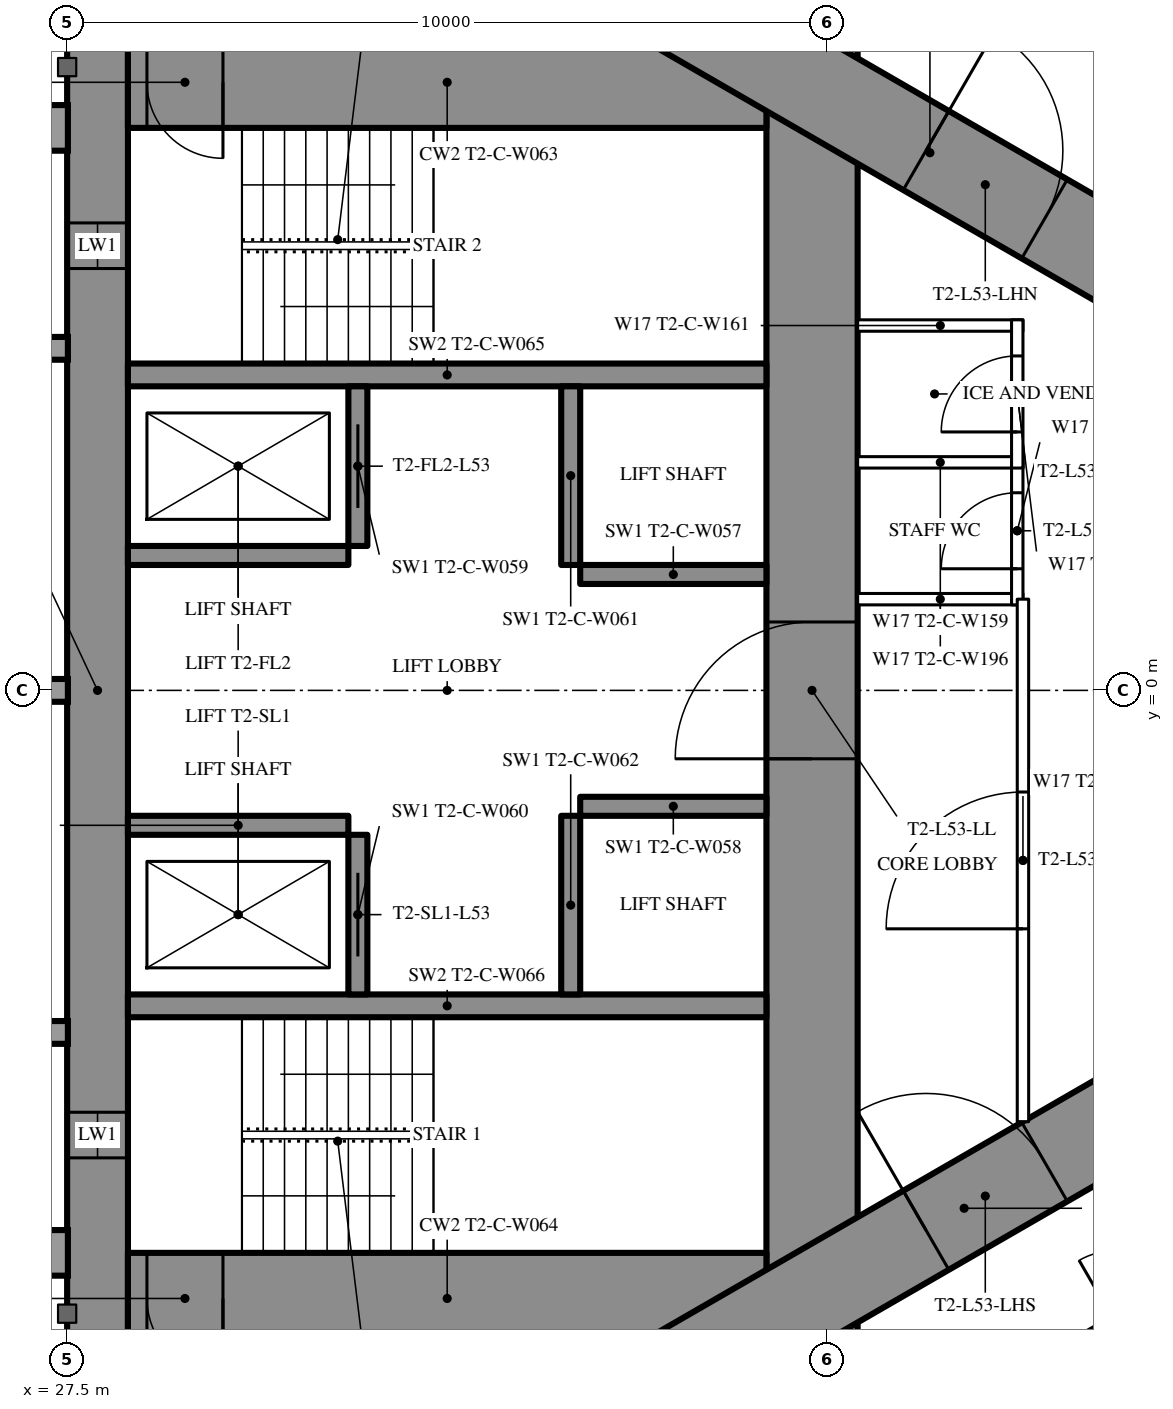
"""IFC4 building model, lengths in metres.
Left out: names, types, materials, properties, quantities, classifications, styles, units other than length and angle.
Written with IfcOpenShell. Run it as: python <this file> out.ifc"""

import sys

from ifc_helpers import new_model, si_unit, direction, frame, frame_2d, origin, place, context, subcontext, project, spatial, rectangle, extrude, element, fill, save


model = new_model("IFC4")
c1 = context("Model", 3, precision=1e-05, world=origin(), true_north=direction((0.0, 1.0)))
c2 = subcontext(c1, "Body", "Model", "MODEL_VIEW")
j1 = project(units=[si_unit("LENGTHUNIT", "METRE"), si_unit("PLANEANGLEUNIT", "RADIAN")], contexts=[c1])
p1 = place(None, origin())
s1 = spatial("IfcSite", under=j1, at=p1, CompositionType="ELEMENT")
p2 = place(p1, origin())
s2 = spatial("IfcBuilding", under=s1, at=p2, CompositionType="ELEMENT")
p3 = place(p2, frame((0.0, 0.0, 198.3)))
s3 = spatial("IfcBuildingStorey", under=s2, at=p3, CompositionType="ELEMENT", Elevation=198.3)
p4 = place(p3, frame((27.9, -8.6, 0.0), z_axis=(0.0, 0.0, 1.0), x_axis=(0.0, 1.0, 0.0)))
e1 = element("IfcWall", 1, at=p4, inside=s3, PredefinedType="SHEAR", context=c2, shape_type="SweptSolid", body=[
    extrude(rectangle(XDim=17.2, YDim=0.8, at=frame_2d((8.6, 0.0))), origin(), (0.0, 0.0, 1.0), 3.5),
])
p5 = place(p4, frame((2.45, 0.0, 0.6)))
e2 = element("IfcOpeningElement", 2, at=p5, cuts=e1, PredefinedType="OPENING", context=c2, shape_type="SweptSolid", body=[
    extrude(rectangle(XDim=0.6, YDim=2.1, at=frame_2d((0.3, 1.05))), frame((0.0, 0.41, 0.0), z_axis=(0.0, -1.0, 0.0), x_axis=(1.0, 0.0, 0.0)), (0.0, 0.0, 1.0), 0.82),
])
p6 = place(p4, frame((14.15, 0.0, 0.6)))
e3 = element("IfcOpeningElement", 3, at=p6, cuts=e1, PredefinedType="OPENING", context=c2, shape_type="SweptSolid", body=[
    extrude(rectangle(XDim=0.6, YDim=2.1, at=frame_2d((0.3, 1.05))), frame((0.0, 0.41, 0.0), z_axis=(0.0, -1.0, 0.0), x_axis=(1.0, 0.0, 0.0)), (0.0, 0.0, 1.0), 0.82),
])
p7 = place(p3, frame((37.3, -8.6, 0.0), z_axis=(0.0, 0.0, 1.0), x_axis=(0.0, 1.0, 0.0)))
e4 = element("IfcWall", 4, at=p7, inside=s3, PredefinedType="SHEAR", context=c2, shape_type="SweptSolid", body=[
    extrude(rectangle(XDim=17.2, YDim=1.2, at=frame_2d((8.6, 0.0))), origin(), (0.0, 0.0, 1.0), 3.5),
])
p8 = place(p7, frame((7.7, 0.0, 0.0)))
e5 = element("IfcOpeningElement", 5, at=p8, cuts=e4, PredefinedType="OPENING", context=c2, shape_type="SweptSolid", body=[
    extrude(rectangle(XDim=1.8, YDim=2.2, at=frame_2d((0.9, 1.1))), frame((0.0, 0.61, 0.0), z_axis=(0.0, -1.0, 0.0), x_axis=(1.0, 0.0, 0.0)), (0.0, 0.0, 1.0), 1.22),
])
p9 = place(p3, frame((28.3, -8.0, 0.0), z_axis=(0.0, 0.0, 1.0), x_axis=(1.0, 0.0, 0.0)))
e6 = element("IfcWall", 6, at=p9, inside=s3, PredefinedType="SHEAR", context=c2, shape_type="SweptSolid", body=[
    extrude(rectangle(XDim=8.4, YDim=1.2, at=frame_2d((4.2, 0.0))), origin(), (0.0, 0.0, 1.0), 3.5),
])
p10 = place(p9, frame((0.25, 0.0, 0.0)))
e7 = element("IfcOpeningElement", 7, at=p10, cuts=e6, PredefinedType="OPENING", context=c2, shape_type="SweptSolid", body=[
    extrude(rectangle(XDim=1.0, YDim=2.2, at=frame_2d((0.5, 1.1))), frame((0.0, 0.61, 0.0), z_axis=(0.0, -1.0, 0.0), x_axis=(1.0, 0.0, 0.0)), (0.0, 0.0, 1.0), 1.22),
])
p11 = place(p3, frame((28.3, 8.0, 0.0), z_axis=(0.0, 0.0, 1.0), x_axis=(1.0, 0.0, 0.0)))
e8 = element("IfcWall", 8, at=p11, inside=s3, PredefinedType="SHEAR", context=c2, shape_type="SweptSolid", body=[
    extrude(rectangle(XDim=8.4, YDim=1.2, at=frame_2d((4.2, 0.0))), origin(), (0.0, 0.0, 1.0), 3.5),
])
p12 = place(p11, frame((0.25, 0.0, 0.0)))
e9 = element("IfcOpeningElement", 9, at=p12, cuts=e8, PredefinedType="OPENING", context=c2, shape_type="SweptSolid", body=[
    extrude(rectangle(XDim=1.0, YDim=2.2, at=frame_2d((0.5, 1.1))), frame((0.0, 0.61, 0.0), z_axis=(0.0, -1.0, 0.0), x_axis=(1.0, 0.0, 0.0)), (0.0, 0.0, 1.0), 1.22),
])
for number, where, z_axis, x_axis in (
    (10, (28.3, -4.15, 0.0), (0.0, 0.0, 1.0), (1.0, 0.0, 0.0)),
    (11, (28.3, 4.15, 0.0), (0.0, 0.0, 1.0), (1.0, 0.0, 0.0)),
):
    element("IfcWall", number, at=place(p3, frame(where, z_axis=z_axis, x_axis=x_axis)), inside=s3, PredefinedType="SHEAR", context=c2, shape_type="SweptSolid", body=[
        extrude(rectangle(XDim=8.4, YDim=0.3, at=frame_2d((4.2, 0.0))), origin(), (0.0, 0.0, 1.0), 3.5),
    ])
p13 = place(p3, frame((31.325, -4.0, 0.0), z_axis=(0.0, 0.0, 1.0), x_axis=(0.0, 1.0, 0.0)))
e12 = element("IfcWall", 12, at=p13, inside=s3, PredefinedType="SHEAR", context=c2, shape_type="SweptSolid", body=[
    extrude(rectangle(XDim=2.1, YDim=0.25, at=frame_2d((1.05, 0.0))), origin(), (0.0, 0.0, 1.0), 3.5),
])
p14 = place(p13, frame((0.5, 0.0, 0.0)))
e13 = element("IfcOpeningElement", 13, at=p14, cuts=e12, PredefinedType="OPENING", context=c2, shape_type="SweptSolid", body=[
    extrude(rectangle(XDim=1.1, YDim=2.2, at=frame_2d((0.55, 1.1))), frame((0.0, 0.135, 0.0), z_axis=(0.0, -1.0, 0.0), x_axis=(1.0, 0.0, 0.0)), (0.0, 0.0, 1.0), 0.27),
])
p15 = place(p3, frame((34.125, -4.0, 0.0), z_axis=(0.0, 0.0, 1.0), x_axis=(0.0, 1.0, 0.0)))
e14 = element("IfcWall", 14, at=p15, inside=s3, PredefinedType="SHEAR", context=c2, shape_type="SweptSolid", body=[
    extrude(rectangle(XDim=2.35, YDim=0.25, at=frame_2d((1.175, 0.0))), origin(), (0.0, 0.0, 1.0), 3.5),
])
p16 = place(p3, frame((28.3, -1.775, 0.0), z_axis=(0.0, 0.0, 1.0), x_axis=(1.0, 0.0, 0.0)))
e15 = element("IfcWall", 15, at=p16, inside=s3, PredefinedType="SHEAR", context=c2, shape_type="SweptSolid", body=[
    extrude(rectangle(XDim=2.9, YDim=0.25, at=frame_2d((1.45, 0.0))), origin(), (0.0, 0.0, 1.0), 3.5),
])
p17 = place(p3, frame((34.25, -1.525, 0.0), z_axis=(0.0, 0.0, 1.0), x_axis=(1.0, 0.0, 0.0)))
e16 = element("IfcWall", 16, at=p17, inside=s3, PredefinedType="SHEAR", context=c2, shape_type="SweptSolid", body=[
    extrude(rectangle(XDim=2.45, YDim=0.25, at=frame_2d((1.225, 0.0))), origin(), (0.0, 0.0, 1.0), 3.5),
])
p18 = place(p3, frame((31.325, 1.9, 0.0), z_axis=(0.0, 0.0, 1.0), x_axis=(0.0, 1.0, 0.0)))
e17 = element("IfcWall", 17, at=p18, inside=s3, PredefinedType="SHEAR", context=c2, shape_type="SweptSolid", body=[
    extrude(rectangle(XDim=2.1, YDim=0.25, at=frame_2d((1.05, 0.0))), origin(), (0.0, 0.0, 1.0), 3.5),
])
p19 = place(p18, frame((0.5, 0.0, 0.0)))
e18 = element("IfcOpeningElement", 18, at=p19, cuts=e17, PredefinedType="OPENING", context=c2, shape_type="SweptSolid", body=[
    extrude(rectangle(XDim=1.1, YDim=2.2, at=frame_2d((0.55, 1.1))), frame((0.0, 0.135, 0.0), z_axis=(0.0, -1.0, 0.0), x_axis=(1.0, 0.0, 0.0)), (0.0, 0.0, 1.0), 0.27),
])
p20 = place(p3, frame((34.125, 1.65, 0.0), z_axis=(0.0, 0.0, 1.0), x_axis=(0.0, 1.0, 0.0)))
e19 = element("IfcWall", 19, at=p20, inside=s3, PredefinedType="SHEAR", context=c2, shape_type="SweptSolid", body=[
    extrude(rectangle(XDim=2.35, YDim=0.25, at=frame_2d((1.175, 0.0))), origin(), (0.0, 0.0, 1.0), 3.5),
])
p21 = place(p3, frame((28.3, 1.775, 0.0), z_axis=(0.0, 0.0, 1.0), x_axis=(1.0, 0.0, 0.0)))
e20 = element("IfcWall", 20, at=p21, inside=s3, PredefinedType="SHEAR", context=c2, shape_type="SweptSolid", body=[
    extrude(rectangle(XDim=2.9, YDim=0.25, at=frame_2d((1.45, 0.0))), origin(), (0.0, 0.0, 1.0), 3.5),
])
p22 = place(p3, frame((34.25, 1.525, 0.0), z_axis=(0.0, 0.0, 1.0), x_axis=(1.0, 0.0, 0.0)))
e21 = element("IfcWall", 21, at=p22, inside=s3, PredefinedType="SHEAR", context=c2, shape_type="SweptSolid", body=[
    extrude(rectangle(XDim=2.45, YDim=0.25, at=frame_2d((1.225, 0.0))), origin(), (0.0, 0.0, 1.0), 3.5),
])
p23 = place(p3, frame((27.2, -13.8, 0.0), z_axis=(0.0, 0.0, 1.0), x_axis=(0.866027159892, 0.499996958321, 0.0)))
e22 = element("IfcWall", 22, at=p23, inside=s3, PredefinedType="SHEAR", context=c2, shape_type="SweptSolid", body=[
    extrude(rectangle(XDim=27.947, YDim=1.2, at=frame_2d((13.973, 0.0))), origin(), (0.0, 0.0, 1.0), 3.5),
])
p24 = place(p23, frame((4.6, 0.0, 0.0)))
e23 = element("IfcOpeningElement", 23, at=p24, cuts=e22, PredefinedType="OPENING", context=c2, shape_type="SweptSolid", body=[
    extrude(rectangle(XDim=1.0, YDim=2.2, at=frame_2d((0.5, 1.1))), frame((0.0, 0.61, 0.0), z_axis=(0.0, -1.0, 0.0), x_axis=(1.0, 0.0, 0.0)), (0.0, 0.0, 1.0), 1.22),
])
p25 = place(p23, frame((13.395, 0.0, 0.0)))
e24 = element("IfcOpeningElement", 24, at=p25, cuts=e22, PredefinedType="OPENING", context=c2, shape_type="SweptSolid", body=[
    extrude(rectangle(XDim=1.8, YDim=2.2, at=frame_2d((0.9, 1.1))), frame((0.0, 0.61, 0.0), z_axis=(0.0, -1.0, 0.0), x_axis=(1.0, 0.0, 0.0)), (0.0, 0.0, 1.0), 1.22),
])
p26 = place(p3, frame((27.2, 13.8, 0.0), z_axis=(0.0, 0.0, 1.0), x_axis=(0.866024515034, -0.500001539357, 0.0)))
e25 = element("IfcWall", 25, at=p26, inside=s3, PredefinedType="SHEAR", context=c2, shape_type="SweptSolid", body=[
    extrude(rectangle(XDim=26.907, YDim=1.2, at=frame_2d((13.454, 0.0))), origin(), (0.0, 0.0, 1.0), 3.5),
])
p27 = place(p26, frame((4.6, 0.0, 0.0)))
e26 = element("IfcOpeningElement", 26, at=p27, cuts=e25, PredefinedType="OPENING", context=c2, shape_type="SweptSolid", body=[
    extrude(rectangle(XDim=1.0, YDim=2.2, at=frame_2d((0.5, 1.1))), frame((0.0, 0.61, 0.0), z_axis=(0.0, -1.0, 0.0), x_axis=(1.0, 0.0, 0.0)), (0.0, 0.0, 1.0), 1.22),
])
p28 = place(p26, frame((13.395, 0.0, 0.0)))
e27 = element("IfcOpeningElement", 27, at=p28, cuts=e25, PredefinedType="OPENING", context=c2, shape_type="SweptSolid", body=[
    extrude(rectangle(XDim=1.8, YDim=2.2, at=frame_2d((0.9, 1.1))), frame((0.0, 0.61, 0.0), z_axis=(0.0, -1.0, 0.0), x_axis=(1.0, 0.0, 0.0)), (0.0, 0.0, 1.0), 1.22),
])
p29 = place(p3, frame((27.959, -16.017, 0.0), z_axis=(0.0, 0.0, 1.0), x_axis=(0.866024151371, 0.500002169237, 0.0)))
e28 = element("IfcWall", 28, at=p29, inside=s3, PredefinedType="PARTITIONING", context=c2, shape_type="SweptSolid", body=[
    extrude(rectangle(XDim=32.034, YDim=0.2, at=frame_2d((16.017, 0.0))), origin(), (0.0, 0.0, 1.0), 3.25),
])
p30 = place(p29, frame((0.6, 0.0, 0.0)))
e29 = element("IfcOpeningElement", 29, at=p30, cuts=e28, PredefinedType="OPENING", context=c2, shape_type="SweptSolid", body=[
    extrude(rectangle(XDim=0.95, YDim=2.2, at=frame_2d((0.475, 1.1))), frame((0.0, 0.11, 0.0), z_axis=(0.0, -1.0, 0.0), x_axis=(1.0, 0.0, 0.0)), (0.0, 0.0, 1.0), 0.22),
])
p31 = place(p29, frame((13.132, 0.0, 0.0)))
e30 = element("IfcOpeningElement", 30, at=p31, cuts=e28, PredefinedType="OPENING", context=c2, shape_type="SweptSolid", body=[
    extrude(rectangle(XDim=0.95, YDim=2.2, at=frame_2d((0.475, 1.1))), frame((0.0, 0.11, 0.0), z_axis=(0.0, -1.0, 0.0), x_axis=(1.0, 0.0, 0.0)), (0.0, 0.0, 1.0), 0.22),
])
p32 = place(p29, frame((15.391, 0.0, 0.0)))
e31 = element("IfcOpeningElement", 31, at=p32, cuts=e28, PredefinedType="OPENING", context=c2, shape_type="SweptSolid", body=[
    extrude(rectangle(XDim=0.95, YDim=2.2, at=frame_2d((0.475, 1.1))), frame((0.0, 0.11, 0.0), z_axis=(0.0, -1.0, 0.0), x_axis=(1.0, 0.0, 0.0)), (0.0, 0.0, 1.0), 0.22),
])
p33 = place(p29, frame((19.441, 0.0, 0.0)))
e32 = element("IfcOpeningElement", 32, at=p33, cuts=e28, PredefinedType="OPENING", context=c2, shape_type="SweptSolid", body=[
    extrude(rectangle(XDim=0.95, YDim=2.2, at=frame_2d((0.475, 1.1))), frame((0.0, 0.11, 0.0), z_axis=(0.0, -1.0, 0.0), x_axis=(1.0, 0.0, 0.0)), (0.0, 0.0, 1.0), 0.22),
])
p34 = place(p29, frame((26.406, 0.0, 0.0)))
e33 = element("IfcOpeningElement", 33, at=p34, cuts=e28, PredefinedType="OPENING", context=c2, shape_type="SweptSolid", body=[
    extrude(rectangle(XDim=0.95, YDim=2.2, at=frame_2d((0.475, 1.1))), frame((0.0, 0.11, 0.0), z_axis=(0.0, -1.0, 0.0), x_axis=(1.0, 0.0, 0.0)), (0.0, 0.0, 1.0), 0.22),
])
p35 = place(p29, frame((28.87, 0.0, 0.0)))
e34 = element("IfcOpeningElement", 34, at=p35, cuts=e28, PredefinedType="OPENING", context=c2, shape_type="SweptSolid", body=[
    extrude(rectangle(XDim=1.8, YDim=2.2, at=frame_2d((0.9, 1.1))), frame((0.0, 0.11, 0.0), z_axis=(0.0, -1.0, 0.0), x_axis=(1.0, 0.0, 0.0)), (0.0, 0.0, 1.0), 0.22),
])
for number, where, z_axis, x_axis in (
    (35, (37.9, 1.2, 0.0), (0.0, 0.0, 1.0), (1.0, 0.0, 0.0)),
    (36, (37.9, 3.0, 0.0), (0.0, 0.0, 1.0), (1.0, 0.0, 0.0)),
    (37, (37.9, 4.8, 0.0), (0.0, 0.0, 1.0), (1.0, 0.0, 0.0)),
):
    element("IfcWall", number, at=place(p3, frame(where, z_axis=z_axis, x_axis=x_axis)), inside=s3, PredefinedType="PARTITIONING", context=c2, shape_type="SweptSolid", body=[
        extrude(rectangle(XDim=2.175, YDim=0.15, at=frame_2d((1.087, 0.0))), origin(), (0.0, 0.0, 1.0), 3.25),
    ])
p36 = place(p3, frame((40.0, 1.125, 0.0), z_axis=(0.0, 0.0, 1.0), x_axis=(0.0, 1.0, 0.0)))
e38 = element("IfcWall", 38, at=p36, inside=s3, PredefinedType="PARTITIONING", context=c2, shape_type="SweptSolid", body=[
    extrude(rectangle(XDim=1.95, YDim=0.15, at=frame_2d((0.975, 0.0))), origin(), (0.0, 0.0, 1.0), 3.25),
])
p37 = place(p36, frame((0.475, 0.0, 0.0)))
e39 = element("IfcOpeningElement", 39, at=p37, cuts=e38, PredefinedType="OPENING", context=c2, shape_type="SweptSolid", body=[
    extrude(rectangle(XDim=1.0, YDim=2.2, at=frame_2d((0.5, 1.1))), frame((0.0, 0.085, 0.0), z_axis=(0.0, -1.0, 0.0), x_axis=(1.0, 0.0, 0.0)), (0.0, 0.0, 1.0), 0.17),
])
p38 = place(p3, frame((40.0, 2.925, 0.0), z_axis=(0.0, 0.0, 1.0), x_axis=(0.0, 1.0, 0.0)))
e40 = element("IfcWall", 40, at=p38, inside=s3, PredefinedType="PARTITIONING", context=c2, shape_type="SweptSolid", body=[
    extrude(rectangle(XDim=1.95, YDim=0.15, at=frame_2d((0.975, 0.0))), origin(), (0.0, 0.0, 1.0), 3.25),
])
p39 = place(p38, frame((0.475, 0.0, 0.0)))
e41 = element("IfcOpeningElement", 41, at=p39, cuts=e40, PredefinedType="OPENING", context=c2, shape_type="SweptSolid", body=[
    extrude(rectangle(XDim=1.0, YDim=2.2, at=frame_2d((0.5, 1.1))), frame((0.0, 0.085, 0.0), z_axis=(0.0, -1.0, 0.0), x_axis=(1.0, 0.0, 0.0)), (0.0, 0.0, 1.0), 0.17),
])
p40 = place(p3, frame((40.075, -5.674, 0.0), z_axis=(0.0, 0.0, 1.0), x_axis=(0.0, 1.0, 0.0)))
e42 = element("IfcWall", 42, at=p40, inside=s3, PredefinedType="PARTITIONING", context=c2, shape_type="SweptSolid", body=[
    extrude(rectangle(XDim=6.874, YDim=0.15, at=frame_2d((3.437, 0.0))), origin(), (0.0, 0.0, 1.0), 3.25),
])
p41 = place(p40, frame((2.537, 0.0, 0.0)))
e43 = element("IfcOpeningElement", 43, at=p41, cuts=e42, PredefinedType="OPENING", context=c2, shape_type="SweptSolid", body=[
    extrude(rectangle(XDim=1.8, YDim=2.2, at=frame_2d((0.9, 1.1))), frame((0.0, 0.085, 0.0), z_axis=(0.0, -1.0, 0.0), x_axis=(1.0, 0.0, 0.0)), (0.0, 0.0, 1.0), 0.17),
])
p42 = place(p37, origin())
e44 = element("IfcDoor", 44, at=p42, inside=s3, OperationType="SINGLE_SWING_LEFT", PredefinedType="DOOR", context=c2, shape_type="SweptSolid", body=[
    extrude(rectangle(XDim=1.0, YDim=2.2, at=frame_2d((0.5, 1.1))), frame((0.0, 0.025, 0.0), z_axis=(0.0, -1.0, 0.0), x_axis=(1.0, 0.0, 0.0)), (0.0, 0.0, 1.0), 0.05),
])
fill(e39, e44)
p43 = place(p39, origin())
e45 = element("IfcDoor", 45, at=p43, inside=s3, OperationType="SINGLE_SWING_LEFT", PredefinedType="DOOR", context=c2, shape_type="SweptSolid", body=[
    extrude(rectangle(XDim=1.0, YDim=2.2, at=frame_2d((0.5, 1.1))), frame((0.0, 0.025, 0.0), z_axis=(0.0, -1.0, 0.0), x_axis=(1.0, 0.0, 0.0)), (0.0, 0.0, 1.0), 0.05),
])
fill(e41, e45)
p44 = place(p41, origin())
e46 = element("IfcDoor", 46, at=p44, inside=s3, OperationType="DOUBLE_DOOR_SINGLE_SWING", PredefinedType="DOOR", context=c2, shape_type="SweptSolid", body=[
    extrude(rectangle(XDim=1.8, YDim=2.2, at=frame_2d((0.9, 1.1))), frame((0.0, 0.025, 0.0), z_axis=(0.0, -1.0, 0.0), x_axis=(1.0, 0.0, 0.0)), (0.0, 0.0, 1.0), 0.05),
])
fill(e43, e46)
p45 = place(p25, origin())
e47 = element("IfcDoor", 47, at=p45, inside=s3, OperationType="DOUBLE_DOOR_SINGLE_SWING", PredefinedType="DOOR", context=c2, shape_type="SweptSolid", body=[
    extrude(rectangle(XDim=1.8, YDim=2.2, at=frame_2d((0.9, 1.1))), frame((0.0, 0.025, 0.0), z_axis=(0.0, -1.0, 0.0), x_axis=(1.0, 0.0, 0.0)), (0.0, 0.0, 1.0), 0.05),
])
fill(e24, e47)
p46 = place(p28, origin())
e48 = element("IfcDoor", 48, at=p46, inside=s3, OperationType="DOUBLE_DOOR_SINGLE_SWING", PredefinedType="DOOR", context=c2, shape_type="SweptSolid", body=[
    extrude(rectangle(XDim=1.8, YDim=2.2, at=frame_2d((0.9, 1.1))), frame((0.0, 0.025, 0.0), z_axis=(0.0, -1.0, 0.0), x_axis=(1.0, 0.0, 0.0)), (0.0, 0.0, 1.0), 0.05),
])
fill(e27, e48)
p47 = place(p8, origin())
e49 = element("IfcDoor", 49, at=p47, inside=s3, OperationType="DOUBLE_DOOR_SINGLE_SWING", PredefinedType="DOOR", context=c2, shape_type="SweptSolid", body=[
    extrude(rectangle(XDim=1.8, YDim=2.2, at=frame_2d((0.9, 1.1))), frame((0.0, 0.025, 0.0), z_axis=(0.0, -1.0, 0.0), x_axis=(1.0, 0.0, 0.0)), (0.0, 0.0, 1.0), 0.05),
])
fill(e5, e49)
p48 = place(p10, origin())
e50 = element("IfcDoor", 50, at=p48, inside=s3, OperationType="SINGLE_SWING_RIGHT", PredefinedType="DOOR", context=c2, shape_type="SweptSolid", body=[
    extrude(rectangle(XDim=1.0, YDim=2.2, at=frame_2d((0.5, 1.1))), frame((0.0, 0.025, 0.0), z_axis=(0.0, -1.0, 0.0), x_axis=(1.0, 0.0, 0.0)), (0.0, 0.0, 1.0), 0.05),
])
fill(e7, e50)
p49 = place(p12, origin())
e51 = element("IfcDoor", 51, at=p49, inside=s3, OperationType="SINGLE_SWING_RIGHT", PredefinedType="DOOR", context=c2, shape_type="SweptSolid", body=[
    extrude(rectangle(XDim=1.0, YDim=2.2, at=frame_2d((0.5, 1.1))), frame((0.0, 0.025, 0.0), z_axis=(0.0, -1.0, 0.0), x_axis=(1.0, 0.0, 0.0)), (0.0, 0.0, 1.0), 0.05),
])
fill(e9, e51)
p50 = place(p14, origin())
e52 = element("IfcDoor", 52, at=p50, inside=s3, OperationType="SLIDING_TO_LEFT", PredefinedType="USERDEFINED", context=c2, shape_type="SweptSolid", body=[
    extrude(rectangle(XDim=1.1, YDim=2.2, at=frame_2d((0.55, 1.1))), frame((0.0, 0.025, 0.0), z_axis=(0.0, -1.0, 0.0), x_axis=(1.0, 0.0, 0.0)), (0.0, 0.0, 1.0), 0.05),
])
fill(e13, e52)
p51 = place(p19, origin())
e53 = element("IfcDoor", 53, at=p51, inside=s3, OperationType="SLIDING_TO_LEFT", PredefinedType="USERDEFINED", context=c2, shape_type="SweptSolid", body=[
    extrude(rectangle(XDim=1.1, YDim=2.2, at=frame_2d((0.55, 1.1))), frame((0.0, 0.025, 0.0), z_axis=(0.0, -1.0, 0.0), x_axis=(1.0, 0.0, 0.0)), (0.0, 0.0, 1.0), 0.05),
])
fill(e18, e53)
p52 = place(p5, origin())
e54 = element("IfcWindow", 54, at=p52, inside=s3, PartitioningType="SINGLE_PANEL", PredefinedType="WINDOW", context=c2, shape_type="SweptSolid", body=[
    extrude(rectangle(XDim=0.6, YDim=2.1, at=frame_2d((0.3, 1.05))), frame((0.0, 0.03, 0.0), z_axis=(0.0, -1.0, 0.0), x_axis=(1.0, 0.0, 0.0)), (0.0, 0.0, 1.0), 0.06),
])
fill(e2, e54)
p53 = place(p6, origin())
e55 = element("IfcWindow", 55, at=p53, inside=s3, PartitioningType="SINGLE_PANEL", PredefinedType="WINDOW", context=c2, shape_type="SweptSolid", body=[
    extrude(rectangle(XDim=0.6, YDim=2.1, at=frame_2d((0.3, 1.05))), frame((0.0, 0.03, 0.0), z_axis=(0.0, -1.0, 0.0), x_axis=(1.0, 0.0, 0.0)), (0.0, 0.0, 1.0), 0.06),
])
fill(e3, e55)
save(model, sys.argv[1])
